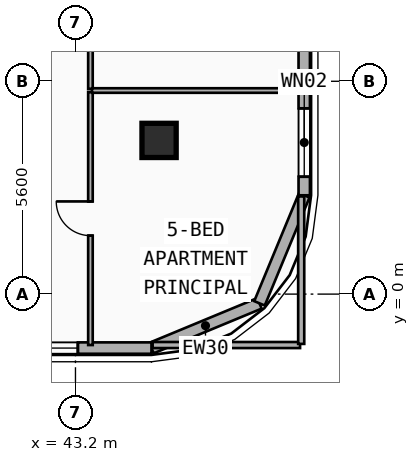
"""IFC4 building model, lengths in metres.
Left out: names, types, materials, properties, quantities, classifications, styles, units other than length and angle.
Written with IfcOpenShell. Run it as: python <this file> out.ifc"""

import sys

from ifc_helpers import new_model, si_unit, direction, frame, frame_2d, origin, origin_2d, place, context, subcontext, project, spatial, rectangle, extrude, element, fill, save


model = new_model("IFC4")
c1 = context("Model", 3, precision=1e-05, world=origin(), true_north=direction((0.0, 1.0)))
c2 = subcontext(c1, "Body", "Model", "MODEL_VIEW")
j1 = project(units=[si_unit("LENGTHUNIT", "METRE"), si_unit("PLANEANGLEUNIT", "RADIAN")], contexts=[c1])
p1 = place(None, origin())
s1 = spatial("IfcSite", under=j1, at=p1, CompositionType="ELEMENT")
p2 = place(p1, origin())
s2 = spatial("IfcBuilding", under=s1, at=p2, CompositionType="ELEMENT")
p3 = place(p2, frame((0.0, 0.0, 243.6)))
s3 = spatial("IfcBuildingStorey", under=s2, at=p3, CompositionType="ELEMENT", Elevation=243.6)
p4 = place(p3, frame((45.4, 4.153, 0.0), z_axis=(0.0, -0.090227632116, 0.995921168769), x_axis=(1.0, 0.0, 0.0)))
e1 = element("IfcColumn", 1, at=p4, inside=s3, PredefinedType="COLUMN", context=c2, shape_type="SweptSolid", body=[
    extrude(rectangle(XDim=0.9, YDim=0.9, at=origin_2d()), origin(), (0.0, 0.0, 1.0), 3.715),
])
p5 = place(p3, frame((48.042, -0.243, 0.0), z_axis=(0.0, 0.0, 1.0), x_axis=(-0.92389884758, -0.382636798336, 0.0)))
e2 = element("IfcWall", 2, at=p5, inside=s3, PredefinedType="SOLIDWALL", context=c2, shape_type="SweptSolid", body=[
    extrude(rectangle(XDim=3.077, YDim=0.3, at=frame_2d((1.538, 0.0))), origin(), (0.0, 0.0, 1.0), 3.42),
])
p6 = place(p3, frame((49.22, 2.6, 0.0), z_axis=(0.0, 0.0, 1.0), x_axis=(-0.382676475685, -0.923882414032, 0.0)))
e3 = element("IfcWall", 3, at=p6, inside=s3, PredefinedType="SOLIDWALL", context=c2, shape_type="SweptSolid", body=[
    extrude(rectangle(XDim=3.077, YDim=0.3, at=frame_2d((1.539, 0.0))), origin(), (0.0, 0.0, 1.0), 3.42),
])
p7 = place(p3, frame((49.22, 36.8, 0.0), z_axis=(0.0, 0.0, 1.0), x_axis=(0.0, -1.0, 0.0)))
e4 = element("IfcWall", 4, at=p7, inside=s3, PredefinedType="SOLIDWALL", context=c2, shape_type="SweptSolid", body=[
    extrude(rectangle(XDim=34.2, YDim=0.3, at=frame_2d((17.1, 0.0))), origin(), (0.0, 0.0, 1.0), 3.42),
])
p8 = place(p7, frame((9.5, 0.0, 0.0)))
e5 = element("IfcOpeningElement", 5, at=p8, cuts=e4, PredefinedType="OPENING", context=c2, shape_type="SweptSolid", body=[
    extrude(rectangle(XDim=1.6, YDim=2.2, at=frame_2d((0.8, 1.1))), frame((0.0, 0.16, 0.0), z_axis=(0.0, -1.0, 0.0), x_axis=(1.0, 0.0, 0.0)), (0.0, 0.0, 1.0), 0.32),
])
p9 = place(p7, frame((31.912, 0.0, 0.8)))
e6 = element("IfcOpeningElement", 6, at=p9, cuts=e4, PredefinedType="OPENING", context=c2, shape_type="SweptSolid", body=[
    extrude(rectangle(XDim=1.8, YDim=1.8, at=frame_2d((0.9, 0.9))), frame((0.0, 0.16, 0.0), z_axis=(0.0, -1.0, 0.0), x_axis=(1.0, 0.0, 0.0)), (0.0, 0.0, 1.0), 0.32),
])
p10 = place(p7, frame((27.668, 0.0, 0.75)))
e7 = element("IfcOpeningElement", 7, at=p10, cuts=e4, PredefinedType="OPENING", context=c2, shape_type="SweptSolid", body=[
    extrude(rectangle(XDim=2.1, YDim=2.1, at=frame_2d((1.05, 1.05))), frame((0.0, 0.16, 0.0), z_axis=(0.0, -1.0, 0.0), x_axis=(1.0, 0.0, 0.0)), (0.0, 0.0, 1.0), 0.32),
])
p11 = place(p7, frame((22.503, 0.0, 0.75)))
e8 = element("IfcOpeningElement", 8, at=p11, cuts=e4, PredefinedType="OPENING", context=c2, shape_type="SweptSolid", body=[
    extrude(rectangle(XDim=2.1, YDim=2.1, at=frame_2d((1.05, 1.05))), frame((0.0, 0.16, 0.0), z_axis=(0.0, -1.0, 0.0), x_axis=(1.0, 0.0, 0.0)), (0.0, 0.0, 1.0), 0.32),
])
p12 = place(p7, frame((17.623, 0.0, 0.75)))
e9 = element("IfcOpeningElement", 9, at=p12, cuts=e4, PredefinedType="OPENING", context=c2, shape_type="SweptSolid", body=[
    extrude(rectangle(XDim=2.1, YDim=2.1, at=frame_2d((1.05, 1.05))), frame((0.0, 0.16, 0.0), z_axis=(0.0, -1.0, 0.0), x_axis=(1.0, 0.0, 0.0)), (0.0, 0.0, 1.0), 0.32),
])
p13 = place(p7, frame((13.832, 0.0, 0.75)))
e10 = element("IfcOpeningElement", 10, at=p13, cuts=e4, PredefinedType="OPENING", context=c2, shape_type="SweptSolid", body=[
    extrude(rectangle(XDim=2.1, YDim=2.1, at=frame_2d((1.05, 1.05))), frame((0.0, 0.16, 0.0), z_axis=(0.0, -1.0, 0.0), x_axis=(1.0, 0.0, 0.0)), (0.0, 0.0, 1.0), 0.32),
])
p14 = place(p3, frame((45.2, -1.42, 0.0), z_axis=(0.0, 0.0, 1.0), x_axis=(-1.0, 0.0, 0.0)))
e11 = element("IfcWall", 11, at=p14, inside=s3, PredefinedType="SOLIDWALL", context=c2, shape_type="SweptSolid", body=[
    extrude(rectangle(XDim=32.8, YDim=0.3, at=frame_2d((16.4, 0.0))), origin(), (0.0, 0.0, 1.0), 3.42),
])
p15 = place(p14, frame((29.071, 0.0, 0.75)))
e12 = element("IfcOpeningElement", 12, at=p15, cuts=e11, PredefinedType="OPENING", context=c2, shape_type="SweptSolid", body=[
    extrude(rectangle(XDim=2.1, YDim=2.1, at=frame_2d((1.05, 1.05))), frame((0.0, 0.16, 0.0), z_axis=(0.0, -1.0, 0.0), x_axis=(1.0, 0.0, 0.0)), (0.0, 0.0, 1.0), 0.32),
])
p16 = place(p14, frame((26.745, 0.0, 0.75)))
e13 = element("IfcOpeningElement", 13, at=p16, cuts=e11, PredefinedType="OPENING", context=c2, shape_type="SweptSolid", body=[
    extrude(rectangle(XDim=1.6, YDim=1.95, at=frame_2d((0.8, 0.975))), frame((0.0, 0.16, 0.0), z_axis=(0.0, -1.0, 0.0), x_axis=(1.0, 0.0, 0.0)), (0.0, 0.0, 1.0), 0.32),
])
p17 = place(p14, frame((18.105, 0.0, 0.75)))
e14 = element("IfcOpeningElement", 14, at=p17, cuts=e11, PredefinedType="OPENING", context=c2, shape_type="SweptSolid", body=[
    extrude(rectangle(XDim=2.1, YDim=2.1, at=frame_2d((1.05, 1.05))), frame((0.0, 0.16, 0.0), z_axis=(0.0, -1.0, 0.0), x_axis=(1.0, 0.0, 0.0)), (0.0, 0.0, 1.0), 0.32),
])
p18 = place(p14, frame((21.762, 0.0, 0.75)))
e15 = element("IfcOpeningElement", 15, at=p18, cuts=e11, PredefinedType="OPENING", context=c2, shape_type="SweptSolid", body=[
    extrude(rectangle(XDim=2.1, YDim=2.1, at=frame_2d((1.05, 1.05))), frame((0.0, 0.16, 0.0), z_axis=(0.0, -1.0, 0.0), x_axis=(1.0, 0.0, 0.0)), (0.0, 0.0, 1.0), 0.32),
])
p19 = place(p14, frame((11.364, 0.0, 0.75)))
e16 = element("IfcOpeningElement", 16, at=p19, cuts=e11, PredefinedType="OPENING", context=c2, shape_type="SweptSolid", body=[
    extrude(rectangle(XDim=2.1, YDim=2.1, at=frame_2d((1.05, 1.05))), frame((0.0, 0.16, 0.0), z_axis=(0.0, -1.0, 0.0), x_axis=(1.0, 0.0, 0.0)), (0.0, 0.0, 1.0), 0.32),
])
p20 = place(p14, frame((9.238, 0.0, 0.68)))
e17 = element("IfcOpeningElement", 17, at=p20, cuts=e11, PredefinedType="OPENING", context=c2, shape_type="SweptSolid", body=[
    extrude(rectangle(XDim=1.2, YDim=1.5, at=frame_2d((0.6, 0.75))), frame((0.0, 0.16, 0.0), z_axis=(0.0, -1.0, 0.0), x_axis=(1.0, 0.0, 0.0)), (0.0, 0.0, 1.0), 0.32),
])
p21 = place(p14, frame((14.669, 0.0, 0.75)))
e18 = element("IfcOpeningElement", 18, at=p21, cuts=e11, PredefinedType="OPENING", context=c2, shape_type="SweptSolid", body=[
    extrude(rectangle(XDim=2.1, YDim=2.1, at=frame_2d((1.05, 1.05))), frame((0.0, 0.16, 0.0), z_axis=(0.0, -1.0, 0.0), x_axis=(1.0, 0.0, 0.0)), (0.0, 0.0, 1.0), 0.32),
])
p22 = place(p14, frame((1.937, 0.0, 0.75)))
e19 = element("IfcOpeningElement", 19, at=p22, cuts=e11, PredefinedType="OPENING", context=c2, shape_type="SweptSolid", body=[
    extrude(rectangle(XDim=2.1, YDim=2.1, at=frame_2d((1.05, 1.05))), frame((0.0, 0.16, 0.0), z_axis=(0.0, -1.0, 0.0), x_axis=(1.0, 0.0, 0.0)), (0.0, 0.0, 1.0), 0.32),
])
p23 = place(p14, frame((4.709, 0.0, 0.8)))
e20 = element("IfcOpeningElement", 20, at=p23, cuts=e11, PredefinedType="OPENING", context=c2, shape_type="SweptSolid", body=[
    extrude(rectangle(XDim=1.8, YDim=1.8, at=frame_2d((0.9, 0.9))), frame((0.0, 0.16, 0.0), z_axis=(0.0, -1.0, 0.0), x_axis=(1.0, 0.0, 0.0)), (0.0, 0.0, 1.0), 0.32),
])
p24 = place(p3, frame((43.594, -1.34, 0.0), z_axis=(0.0, 0.0, 1.0), x_axis=(0.0, 1.0, 0.0)))
e21 = element("IfcWall", 21, at=p24, inside=s3, PredefinedType="PARTITIONING", context=c2, shape_type="SweptSolid", body=[
    extrude(rectangle(XDim=6.657, YDim=0.12, at=frame_2d((3.329, 0.0))), origin(), (0.0, 0.0, 1.0), 3.08),
])
p25 = place(p24, frame((2.878, 0.0, 0.0)))
e22 = element("IfcOpeningElement", 22, at=p25, cuts=e21, PredefinedType="OPENING", context=c2, shape_type="SweptSolid", body=[
    extrude(rectangle(XDim=0.9, YDim=2.1, at=frame_2d((0.45, 1.05))), frame((0.0, 0.07, 0.0), z_axis=(0.0, -1.0, 0.0), x_axis=(1.0, 0.0, 0.0)), (0.0, 0.0, 1.0), 0.14),
])
p26 = place(p3, frame((43.594, 5.397, 0.0), z_axis=(0.0, 0.0, 1.0), x_axis=(0.0, 1.0, 0.0)))
e23 = element("IfcWall", 23, at=p26, inside=s3, PredefinedType="PARTITIONING", context=c2, shape_type="SweptSolid", body=[
    extrude(rectangle(XDim=5.369, YDim=0.12, at=frame_2d((2.685, 0.0))), origin(), (0.0, 0.0, 1.0), 3.05),
])
p27 = place(p26, frame((2.235, 0.0, 0.0)))
e24 = element("IfcOpeningElement", 24, at=p27, cuts=e23, PredefinedType="OPENING", context=c2, shape_type="SweptSolid", body=[
    extrude(rectangle(XDim=0.9, YDim=2.1, at=frame_2d((0.45, 1.05))), frame((0.0, 0.07, 0.0), z_axis=(0.0, -1.0, 0.0), x_axis=(1.0, 0.0, 0.0)), (0.0, 0.0, 1.0), 0.14),
])
p28 = place(p3, frame((43.634, 5.357, 0.0), z_axis=(0.0, 0.0, 1.0), x_axis=(1.0, 0.0, 0.0)))
e25 = element("IfcWall", 25, at=p28, inside=s3, PredefinedType="PARTITIONING", context=c2, shape_type="SweptSolid", body=[
    extrude(rectangle(XDim=5.506, YDim=0.12, at=frame_2d((2.753, 0.0))), origin(), (0.0, 0.0, 1.0), 2.7),
])
for number, where, z_axis, x_axis in (
    (26, (45.23, -1.34, 0.0), (0.0, 0.0, 1.0), (1.0, 0.0, 0.0)),
    (27, (49.14, -1.31, 0.0), (0.0, 0.0, 1.0), (0.0, 1.0, 0.0)),
):
    element("IfcWall", number, at=place(p3, frame(where, z_axis=z_axis, x_axis=x_axis)), inside=s3, PredefinedType="PARTITIONING", context=c2, shape_type="SweptSolid", body=[
        extrude(rectangle(XDim=3.88, YDim=0.16, at=frame_2d((1.94, 0.0))), origin(), (0.0, 0.0, 1.0), 3.42),
    ])
p29 = place(p9, origin())
e28 = element("IfcWindow", 28, at=p29, inside=s3, PartitioningType="SINGLE_PANEL", PredefinedType="WINDOW", context=c2, shape_type="SweptSolid", body=[
    extrude(rectangle(XDim=1.8, YDim=1.8, at=frame_2d((0.9, 0.9))), frame((0.0, 0.03, 0.0), z_axis=(0.0, -1.0, 0.0), x_axis=(1.0, 0.0, 0.0)), (0.0, 0.0, 1.0), 0.06),
])
fill(e6, e28)
p30 = place(p22, origin())
e29 = element("IfcWindow", 29, at=p30, inside=s3, PartitioningType="SINGLE_PANEL", PredefinedType="WINDOW", context=c2, shape_type="SweptSolid", body=[
    extrude(rectangle(XDim=2.1, YDim=2.1, at=frame_2d((1.05, 1.05))), frame((0.0, 0.03, 0.0), z_axis=(0.0, -1.0, 0.0), x_axis=(1.0, 0.0, 0.0)), (0.0, 0.0, 1.0), 0.06),
])
fill(e19, e29)
p31 = place(p25, origin())
e30 = element("IfcDoor", 30, at=p31, inside=s3, OperationType="SINGLE_SWING_RIGHT", PredefinedType="DOOR", context=c2, shape_type="SweptSolid", body=[
    extrude(rectangle(XDim=0.9, YDim=2.1, at=frame_2d((0.45, 1.05))), frame((0.0, 0.025, 0.0), z_axis=(0.0, -1.0, 0.0), x_axis=(1.0, 0.0, 0.0)), (0.0, 0.0, 1.0), 0.05),
])
fill(e22, e30)
save(model, sys.argv[1])
